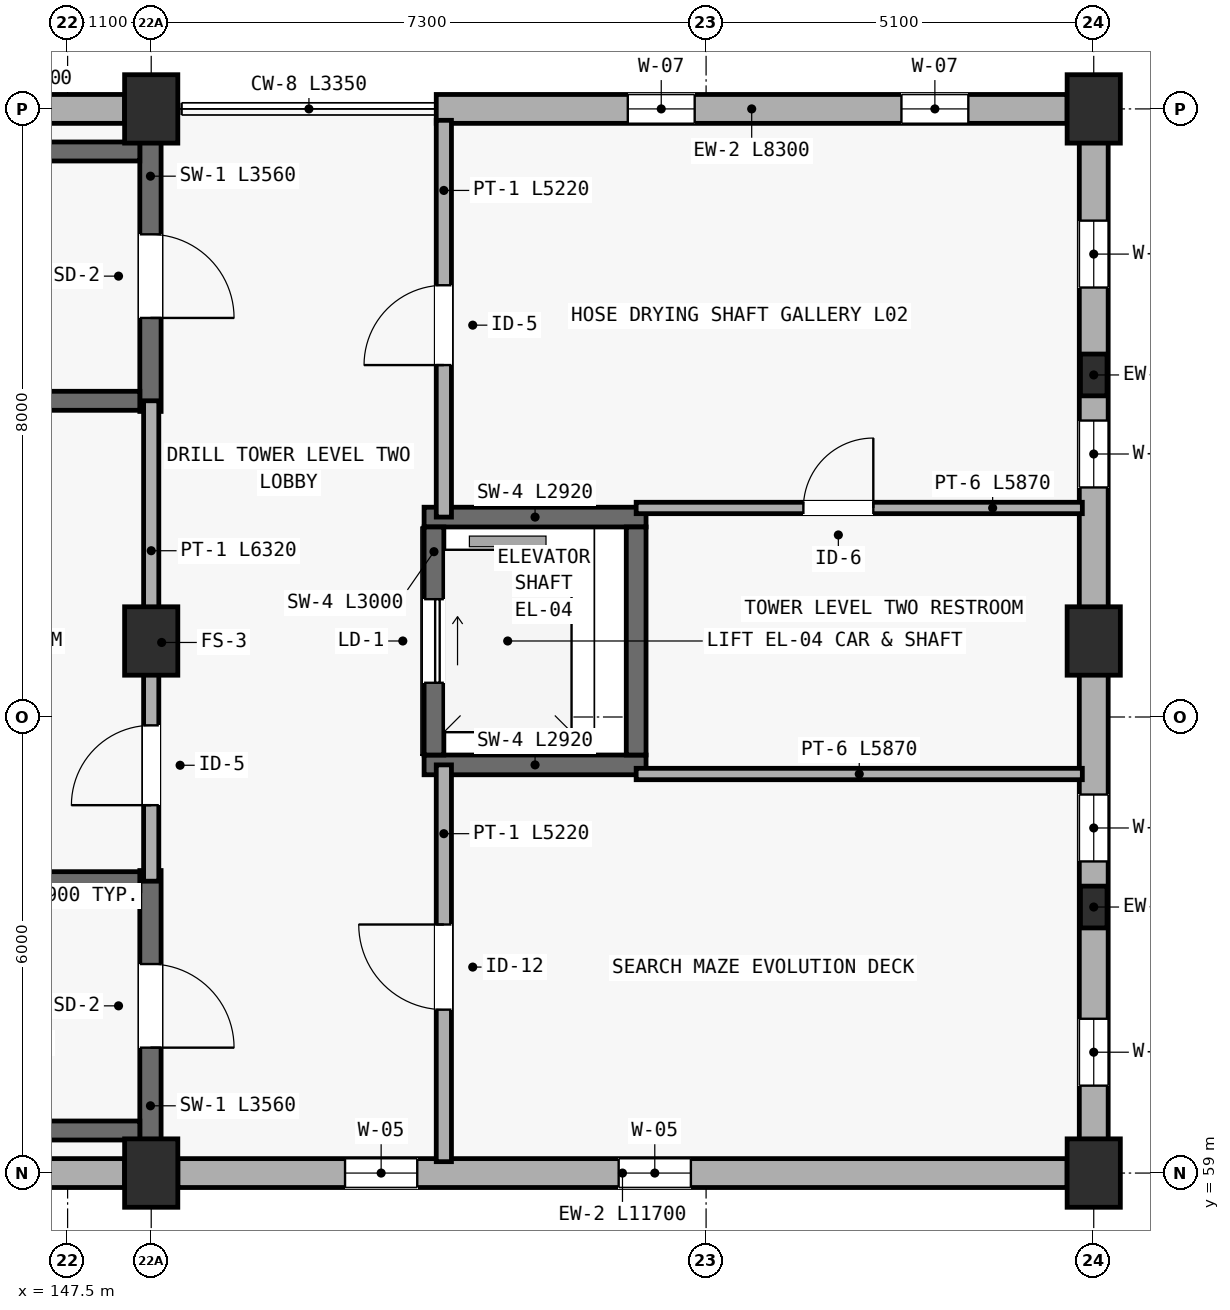
"""IFC4 building model, lengths in metres.
Left out: names, types, materials, properties, quantities, classifications, styles, units other than length and angle.
Written with IfcOpenShell. Run it as: python <this file> out.ifc"""

import sys

from ifc_helpers import new_model, si_unit, direction, frame, frame_2d, origin, origin_2d, place, context, subcontext, project, spatial, rectangle, extrude, element, fill, save


model = new_model("IFC4")
c1 = context("Model", 3, precision=1e-05, world=origin(), true_north=direction((0.0, 1.0)))
c2 = subcontext(c1, "Body", "Model", "MODEL_VIEW")
j1 = project(units=[si_unit("LENGTHUNIT", "METRE"), si_unit("PLANEANGLEUNIT", "RADIAN")], contexts=[c1])
p1 = place(None, origin())
s1 = spatial("IfcSite", under=j1, at=p1, CompositionType="ELEMENT")
p2 = place(p1, origin())
s2 = spatial("IfcBuilding", under=s1, at=p2, CompositionType="ELEMENT")
p3 = place(p2, frame((0.0, 0.0, 5.85)))
s3 = spatial("IfcBuildingStorey", under=s2, at=p3, CompositionType="ELEMENT", Elevation=5.85)
for number, where, z_axis, x_axis in (
    (1, (148.6, 59.0, 0.0), (0.0, 0.0, 1.0), (1.0, 0.0, 0.0)),
    (2, (148.6, 66.0, 0.0), (0.0, 0.0, 1.0), (1.0, 0.0, 0.0)),
    (3, (148.6, 73.0, 0.0), (0.0, 0.0, 1.0), (1.0, 0.0, 0.0)),
    (4, (161.0, 59.0, 0.0), (0.0, 0.0, 1.0), (1.0, 0.0, 0.0)),
    (5, (161.0, 66.0, 0.0), (0.0, 0.0, 1.0), (1.0, 0.0, 0.0)),
    (6, (161.0, 73.0, 0.0), (0.0, 0.0, 1.0), (1.0, 0.0, 0.0)),
):
    element("IfcColumn", number, at=place(p3, frame(where, z_axis=z_axis, x_axis=x_axis)), inside=s3, PredefinedType="COLUMN", context=c2, shape_type="SweptSolid", body=[
        extrude(rectangle(XDim=0.7, YDim=0.9, at=origin_2d()), origin(), (0.0, 0.0, 1.0), 3.45),
    ])
for number, where, z_axis, x_axis in (
    (7, (161.0, 62.5, 0.0), (0.0, 0.0, 1.0), (1.0, 0.0, 0.0)),
    (8, (161.0, 69.5, 0.0), (0.0, 0.0, 1.0), (1.0, 0.0, 0.0)),
):
    element("IfcColumn", number, at=place(p3, frame(where, z_axis=z_axis, x_axis=x_axis)), inside=s3, PredefinedType="PILASTER", context=c2, shape_type="SweptSolid", body=[
        extrude(rectangle(XDim=0.35, YDim=0.55, at=origin_2d()), origin(), (0.0, 0.0, 1.0), 3.45),
    ])
p4 = place(p3, frame((141.45, 59.0, 0.0), z_axis=(0.0, 0.0, 1.0), x_axis=(1.0, 0.0, 0.0)))
e9 = element("IfcWall", 9, at=p4, inside=s3, PredefinedType="STANDARD", context=c2, shape_type="SweptSolid", body=[
    extrude(rectangle(XDim=6.8, YDim=0.38, at=frame_2d((3.4, 0.0))), origin(), (0.0, 0.0, 1.0), 2.75),
])
p5 = place(p4, frame((0.85, 0.0, 0.75)))
e10 = element("IfcOpeningElement", 10, at=p5, cuts=e9, PredefinedType="OPENING", context=c2, shape_type="SweptSolid", body=[
    extrude(rectangle(XDim=1.1, YDim=1.35, at=frame_2d((0.55, 0.675))), frame((0.0, 0.2, 0.0), z_axis=(0.0, -1.0, 0.0), x_axis=(1.0, 0.0, 0.0)), (0.0, 0.0, 1.0), 0.4),
])
p6 = place(p4, frame((4.75, 0.0, 0.75)))
e11 = element("IfcOpeningElement", 11, at=p6, cuts=e9, PredefinedType="OPENING", context=c2, shape_type="SweptSolid", body=[
    extrude(rectangle(XDim=0.98, YDim=1.45, at=frame_2d((0.49, 0.725))), frame((0.0, 0.2, 0.0), z_axis=(0.0, -1.0, 0.0), x_axis=(1.0, 0.0, 0.0)), (0.0, 0.0, 1.0), 0.4),
])
p7 = place(p3, frame((148.95, 59.0, 0.0), z_axis=(0.0, 0.0, 1.0), x_axis=(1.0, 0.0, 0.0)))
e12 = element("IfcWall", 12, at=p7, inside=s3, PredefinedType="STANDARD", context=c2, shape_type="SweptSolid", body=[
    extrude(rectangle(XDim=11.7, YDim=0.38, at=frame_2d((5.85, 0.0))), origin(), (0.0, 0.0, 1.0), 2.75),
])
p8 = place(p7, frame((2.2, 0.0, 0.75)))
e13 = element("IfcOpeningElement", 13, at=p8, cuts=e12, PredefinedType="OPENING", context=c2, shape_type="SweptSolid", body=[
    extrude(rectangle(XDim=0.95, YDim=1.35, at=frame_2d((0.475, 0.675))), frame((0.0, 0.2, 0.0), z_axis=(0.0, -1.0, 0.0), x_axis=(1.0, 0.0, 0.0)), (0.0, 0.0, 1.0), 0.4),
])
p9 = place(p7, frame((5.8, 0.0, 0.75)))
e14 = element("IfcOpeningElement", 14, at=p9, cuts=e12, PredefinedType="OPENING", context=c2, shape_type="SweptSolid", body=[
    extrude(rectangle(XDim=0.95, YDim=1.35, at=frame_2d((0.475, 0.675))), frame((0.0, 0.2, 0.0), z_axis=(0.0, -1.0, 0.0), x_axis=(1.0, 0.0, 0.0)), (0.0, 0.0, 1.0), 0.4),
])
p10 = place(p3, frame((160.65, 73.0, 0.0), z_axis=(0.0, 0.0, 1.0), x_axis=(-1.0, 0.0, 0.0)))
e15 = element("IfcWall", 15, at=p10, inside=s3, PredefinedType="STANDARD", context=c2, shape_type="SweptSolid", body=[
    extrude(rectangle(XDim=8.3, YDim=0.38, at=frame_2d((4.15, 0.0))), origin(), (0.0, 0.0, 1.0), 2.75),
])
p11 = place(p10, frame((1.3, 0.0, 0.75)))
e16 = element("IfcOpeningElement", 16, at=p11, cuts=e15, PredefinedType="OPENING", context=c2, shape_type="SweptSolid", body=[
    extrude(rectangle(XDim=0.88, YDim=1.5, at=frame_2d((0.44, 0.75))), frame((0.0, 0.2, 0.0), z_axis=(0.0, -1.0, 0.0), x_axis=(1.0, 0.0, 0.0)), (0.0, 0.0, 1.0), 0.4),
])
p12 = place(p10, frame((4.9, 0.0, 0.75)))
e17 = element("IfcOpeningElement", 17, at=p12, cuts=e15, PredefinedType="OPENING", context=c2, shape_type="SweptSolid", body=[
    extrude(rectangle(XDim=0.88, YDim=1.5, at=frame_2d((0.44, 0.75))), frame((0.0, 0.2, 0.0), z_axis=(0.0, -1.0, 0.0), x_axis=(1.0, 0.0, 0.0)), (0.0, 0.0, 1.0), 0.4),
])
p13 = place(p3, frame((148.25, 73.0, 0.0), z_axis=(0.0, 0.0, 1.0), x_axis=(-1.0, 0.0, 0.0)))
e18 = element("IfcWall", 18, at=p13, inside=s3, PredefinedType="STANDARD", context=c2, shape_type="SweptSolid", body=[
    extrude(rectangle(XDim=6.8, YDim=0.38, at=frame_2d((3.4, 0.0))), origin(), (0.0, 0.0, 1.0), 2.75),
])
p14 = place(p13, frame((2.4, 0.0, 0.75)))
e19 = element("IfcOpeningElement", 19, at=p14, cuts=e18, PredefinedType="OPENING", context=c2, shape_type="SweptSolid", body=[
    extrude(rectangle(XDim=1.15, YDim=1.45, at=frame_2d((0.575, 0.725))), frame((0.0, 0.2, 0.0), z_axis=(0.0, -1.0, 0.0), x_axis=(1.0, 0.0, 0.0)), (0.0, 0.0, 1.0), 0.4),
])
p15 = place(p3, frame((161.0, 59.35, 0.0), z_axis=(0.0, 0.0, 1.0), x_axis=(0.0, 1.0, 0.0)))
e20 = element("IfcWall", 20, at=p15, inside=s3, PredefinedType="STANDARD", context=c2, shape_type="SweptSolid", body=[
    extrude(rectangle(XDim=6.3, YDim=0.38, at=frame_2d((3.15, 0.0))), origin(), (0.0, 0.0, 1.0), 2.75),
])
p16 = place(p15, frame((0.8, 0.0, 0.75)))
e21 = element("IfcOpeningElement", 21, at=p16, cuts=e20, PredefinedType="OPENING", context=c2, shape_type="SweptSolid", body=[
    extrude(rectangle(XDim=0.88, YDim=1.5, at=frame_2d((0.44, 0.75))), frame((0.0, 0.2, 0.0), z_axis=(0.0, -1.0, 0.0), x_axis=(1.0, 0.0, 0.0)), (0.0, 0.0, 1.0), 0.4),
])
p17 = place(p15, frame((3.75, 0.0, 0.75)))
e22 = element("IfcOpeningElement", 22, at=p17, cuts=e20, PredefinedType="OPENING", context=c2, shape_type="SweptSolid", body=[
    extrude(rectangle(XDim=0.88, YDim=1.5, at=frame_2d((0.44, 0.75))), frame((0.0, 0.2, 0.0), z_axis=(0.0, -1.0, 0.0), x_axis=(1.0, 0.0, 0.0)), (0.0, 0.0, 1.0), 0.4),
])
p18 = place(p3, frame((161.0, 66.35, 0.0), z_axis=(0.0, 0.0, 1.0), x_axis=(0.0, 1.0, 0.0)))
e23 = element("IfcWall", 23, at=p18, inside=s3, PredefinedType="STANDARD", context=c2, shape_type="SweptSolid", body=[
    extrude(rectangle(XDim=6.3, YDim=0.38, at=frame_2d((3.15, 0.0))), origin(), (0.0, 0.0, 1.0), 2.75),
])
p19 = place(p18, frame((1.67, 0.0, 0.75)))
e24 = element("IfcOpeningElement", 24, at=p19, cuts=e23, PredefinedType="OPENING", context=c2, shape_type="SweptSolid", body=[
    extrude(rectangle(XDim=0.88, YDim=1.5, at=frame_2d((0.44, 0.75))), frame((0.0, 0.2, 0.0), z_axis=(0.0, -1.0, 0.0), x_axis=(1.0, 0.0, 0.0)), (0.0, 0.0, 1.0), 0.4),
])
p20 = place(p18, frame((4.3, 0.0, 0.75)))
e25 = element("IfcOpeningElement", 25, at=p20, cuts=e23, PredefinedType="OPENING", context=c2, shape_type="SweptSolid", body=[
    extrude(rectangle(XDim=0.88, YDim=1.5, at=frame_2d((0.44, 0.75))), frame((0.0, 0.2, 0.0), z_axis=(0.0, -1.0, 0.0), x_axis=(1.0, 0.0, 0.0)), (0.0, 0.0, 1.0), 0.4),
])
p21 = place(p3, frame((148.59, 62.98, 0.0), z_axis=(0.0, 0.0, 1.0), x_axis=(0.0, -1.0, 0.0)))
e26 = element("IfcWall", 26, at=p21, inside=s3, PredefinedType="SHEAR", context=c2, shape_type="SweptSolid", body=[
    extrude(rectangle(XDim=3.56, YDim=0.28, at=frame_2d((1.78, 0.0))), origin(), (0.0, 0.0, 1.0), 3.2),
])
p22 = place(p21, frame((1.23, 0.0, 0.0)))
e27 = element("IfcOpeningElement", 27, at=p22, cuts=e26, PredefinedType="OPENING", context=c2, shape_type="SweptSolid", body=[
    extrude(rectangle(XDim=1.1, YDim=2.15, at=frame_2d((0.55, 1.075))), frame((0.0, 0.15, 0.0), z_axis=(0.0, -1.0, 0.0), x_axis=(1.0, 0.0, 0.0)), (0.0, 0.0, 1.0), 0.3),
])
for number, where, z_axis, x_axis in (
    (28, (148.45, 62.84, 0.0), (0.0, 0.0, 1.0), (-1.0, 0.0, 0.0)),
    (29, (141.85, 59.56, 0.0), (0.0, 0.0, 1.0), (1.0, 0.0, 0.0)),
):
    element("IfcWall", number, at=place(p3, frame(where, z_axis=z_axis, x_axis=x_axis)), inside=s3, PredefinedType="SHEAR", context=c2, shape_type="SweptSolid", body=[
        extrude(rectangle(XDim=6.6, YDim=0.25, at=frame_2d((3.3, 0.0))), origin(), (0.0, 0.0, 1.0), 3.2),
    ])
p23 = place(p3, frame((148.59, 72.58, 0.0), z_axis=(0.0, 0.0, 1.0), x_axis=(0.0, -1.0, 0.0)))
e30 = element("IfcWall", 30, at=p23, inside=s3, PredefinedType="SHEAR", context=c2, shape_type="SweptSolid", body=[
    extrude(rectangle(XDim=3.56, YDim=0.28, at=frame_2d((1.78, 0.0))), origin(), (0.0, 0.0, 1.0), 3.2),
])
p24 = place(p23, frame((1.23, 0.0, 0.0)))
e31 = element("IfcOpeningElement", 31, at=p24, cuts=e30, PredefinedType="OPENING", context=c2, shape_type="SweptSolid", body=[
    extrude(rectangle(XDim=1.1, YDim=2.15, at=frame_2d((0.55, 1.075))), frame((0.0, 0.15, 0.0), z_axis=(0.0, -1.0, 0.0), x_axis=(1.0, 0.0, 0.0)), (0.0, 0.0, 1.0), 0.3),
])
for number, where, z_axis, x_axis in (
    (32, (148.45, 72.44, 0.0), (0.0, 0.0, 1.0), (-1.0, 0.0, 0.0)),
    (33, (141.85, 69.16, 0.0), (0.0, 0.0, 1.0), (1.0, 0.0, 0.0)),
):
    element("IfcWall", number, at=place(p3, frame(where, z_axis=z_axis, x_axis=x_axis)), inside=s3, PredefinedType="SHEAR", context=c2, shape_type="SweptSolid", body=[
        extrude(rectangle(XDim=6.6, YDim=0.25, at=frame_2d((3.3, 0.0))), origin(), (0.0, 0.0, 1.0), 3.2),
    ])
for number, where, z_axis, x_axis in (
    (34, (152.19, 64.37, 0.0), (0.0, 0.0, 1.0), (1.0, 0.0, 0.0)),
    (35, (155.11, 67.63, 0.0), (0.0, 0.0, 1.0), (-1.0, 0.0, 0.0)),
):
    element("IfcWall", number, at=place(p3, frame(where, z_axis=z_axis, x_axis=x_axis)), inside=s3, PredefinedType="SHEAR", context=c2, shape_type="SweptSolid", body=[
        extrude(rectangle(XDim=2.92, YDim=0.26, at=frame_2d((1.46, 0.0))), origin(), (0.0, 0.0, 1.0), 3.2),
    ])
p25 = place(p3, frame((152.32, 67.5, 0.0), z_axis=(0.0, 0.0, 1.0), x_axis=(0.0, -1.0, 0.0)))
e36 = element("IfcWall", 36, at=p25, inside=s3, PredefinedType="SHEAR", context=c2, shape_type="SweptSolid", body=[
    extrude(rectangle(XDim=3.0, YDim=0.26, at=frame_2d((1.5, 0.0))), origin(), (0.0, 0.0, 1.0), 3.2),
])
p26 = place(p25, frame((0.95, 0.0, 0.0)))
e37 = element("IfcOpeningElement", 37, at=p26, cuts=e36, PredefinedType="OPENING", context=c2, shape_type="SweptSolid", body=[
    extrude(rectangle(XDim=1.1, YDim=2.15, at=frame_2d((0.55, 1.075))), frame((0.0, 0.14, 0.0), z_axis=(0.0, -1.0, 0.0), x_axis=(1.0, 0.0, 0.0)), (0.0, 0.0, 1.0), 0.28),
])
p27 = place(p3, frame((154.98, 64.5, 0.0), z_axis=(0.0, 0.0, 1.0), x_axis=(0.0, 1.0, 0.0)))
e38 = element("IfcWall", 38, at=p27, inside=s3, PredefinedType="SHEAR", context=c2, shape_type="SweptSolid", body=[
    extrude(rectangle(XDim=3.0, YDim=0.26, at=frame_2d((1.5, 0.0))), origin(), (0.0, 0.0, 1.0), 3.2),
])
p28 = place(p3, frame((148.6, 62.84, 0.0), z_axis=(0.0, 0.0, 1.0), x_axis=(0.0, 1.0, 0.0)))
e39 = element("IfcWall", 39, at=p28, inside=s3, PredefinedType="PARTITIONING", context=c2, shape_type="SweptSolid", body=[
    extrude(rectangle(XDim=6.32, YDim=0.2, at=frame_2d((3.16, 0.0))), origin(), (0.0, 0.0, 1.0), 2.7),
])
p29 = place(p28, frame((1.0, 0.0, 0.0)))
e40 = element("IfcOpeningElement", 40, at=p29, cuts=e39, PredefinedType="OPENING", context=c2, shape_type="SweptSolid", body=[
    extrude(rectangle(XDim=1.05, YDim=2.14, at=frame_2d((0.525, 1.07))), frame((0.0, 0.11, 0.0), z_axis=(0.0, -1.0, 0.0), x_axis=(1.0, 0.0, 0.0)), (0.0, 0.0, 1.0), 0.22),
])
p30 = place(p3, frame((152.45, 59.15, 0.0), z_axis=(0.0, 0.0, 1.0), x_axis=(0.0, 1.0, 0.0)))
e41 = element("IfcWall", 41, at=p30, inside=s3, PredefinedType="PARTITIONING", context=c2, shape_type="SweptSolid", body=[
    extrude(rectangle(XDim=5.22, YDim=0.2, at=frame_2d((2.61, 0.0))), origin(), (0.0, 0.0, 1.0), 2.7),
])
p31 = place(p30, frame((2.0, 0.0, 0.0)))
e42 = element("IfcOpeningElement", 42, at=p31, cuts=e41, PredefinedType="OPENING", context=c2, shape_type="SweptSolid", body=[
    extrude(rectangle(XDim=1.12, YDim=2.15, at=frame_2d((0.56, 1.075))), frame((0.0, 0.11, 0.0), z_axis=(0.0, -1.0, 0.0), x_axis=(1.0, 0.0, 0.0)), (0.0, 0.0, 1.0), 0.22),
])
p32 = place(p3, frame((152.45, 67.63, 0.0), z_axis=(0.0, 0.0, 1.0), x_axis=(0.0, 1.0, 0.0)))
e43 = element("IfcWall", 43, at=p32, inside=s3, PredefinedType="PARTITIONING", context=c2, shape_type="SweptSolid", body=[
    extrude(rectangle(XDim=5.22, YDim=0.2, at=frame_2d((2.61, 0.0))), origin(), (0.0, 0.0, 1.0), 2.7),
])
p33 = place(p32, frame((2.0, 0.0, 0.0)))
e44 = element("IfcOpeningElement", 44, at=p33, cuts=e43, PredefinedType="OPENING", context=c2, shape_type="SweptSolid", body=[
    extrude(rectangle(XDim=1.05, YDim=2.14, at=frame_2d((0.525, 1.07))), frame((0.0, 0.11, 0.0), z_axis=(0.0, -1.0, 0.0), x_axis=(1.0, 0.0, 0.0)), (0.0, 0.0, 1.0), 0.22),
])
p34 = place(p3, frame((154.98, 64.25, 0.0), z_axis=(0.0, 0.0, 1.0), x_axis=(1.0, 0.0, 0.0)))
e45 = element("IfcWall", 45, at=p34, inside=s3, PredefinedType="PARTITIONING", context=c2, shape_type="SweptSolid", body=[
    extrude(rectangle(XDim=5.87, YDim=0.15, at=frame_2d((2.935, 0.0))), origin(), (0.0, 0.0, 1.0), 2.7),
])
p35 = place(p3, frame((154.98, 67.75, 0.0), z_axis=(0.0, 0.0, 1.0), x_axis=(1.0, 0.0, 0.0)))
e46 = element("IfcWall", 46, at=p35, inside=s3, PredefinedType="PARTITIONING", context=c2, shape_type="SweptSolid", body=[
    extrude(rectangle(XDim=5.87, YDim=0.15, at=frame_2d((2.935, 0.0))), origin(), (0.0, 0.0, 1.0), 2.7),
])
p36 = place(p35, frame((2.2, 0.0, 0.0)))
e47 = element("IfcOpeningElement", 47, at=p36, cuts=e46, PredefinedType="OPENING", context=c2, shape_type="SweptSolid", body=[
    extrude(rectangle(XDim=0.92, YDim=2.1, at=frame_2d((0.46, 1.05))), frame((0.0, 0.085, 0.0), z_axis=(0.0, -1.0, 0.0), x_axis=(1.0, 0.0, 0.0)), (0.0, 0.0, 1.0), 0.17),
])
p37 = place(p8, origin())
e48 = element("IfcWindow", 48, at=p37, inside=s3, PartitioningType="SINGLE_PANEL", PredefinedType="WINDOW", context=c2, shape_type="SweptSolid", body=[
    extrude(rectangle(XDim=0.95, YDim=1.35, at=frame_2d((0.475, 0.675))), frame((0.0, 0.03, 0.0), z_axis=(0.0, -1.0, 0.0), x_axis=(1.0, 0.0, 0.0)), (0.0, 0.0, 1.0), 0.06),
])
fill(e13, e48)
p38 = place(p9, origin())
e49 = element("IfcWindow", 49, at=p38, inside=s3, PartitioningType="SINGLE_PANEL", PredefinedType="WINDOW", context=c2, shape_type="SweptSolid", body=[
    extrude(rectangle(XDim=0.95, YDim=1.35, at=frame_2d((0.475, 0.675))), frame((0.0, 0.03, 0.0), z_axis=(0.0, -1.0, 0.0), x_axis=(1.0, 0.0, 0.0)), (0.0, 0.0, 1.0), 0.06),
])
fill(e14, e49)
p39 = place(p11, origin())
e50 = element("IfcWindow", 50, at=p39, inside=s3, PartitioningType="SINGLE_PANEL", PredefinedType="WINDOW", context=c2, shape_type="SweptSolid", body=[
    extrude(rectangle(XDim=0.88, YDim=1.5, at=frame_2d((0.44, 0.75))), frame((0.0, 0.03, 0.0), z_axis=(0.0, -1.0, 0.0), x_axis=(1.0, 0.0, 0.0)), (0.0, 0.0, 1.0), 0.06),
])
fill(e16, e50)
p40 = place(p12, origin())
e51 = element("IfcWindow", 51, at=p40, inside=s3, PartitioningType="SINGLE_PANEL", PredefinedType="WINDOW", context=c2, shape_type="SweptSolid", body=[
    extrude(rectangle(XDim=0.88, YDim=1.5, at=frame_2d((0.44, 0.75))), frame((0.0, 0.03, 0.0), z_axis=(0.0, -1.0, 0.0), x_axis=(1.0, 0.0, 0.0)), (0.0, 0.0, 1.0), 0.06),
])
fill(e17, e51)
p41 = place(p16, origin())
e52 = element("IfcWindow", 52, at=p41, inside=s3, PartitioningType="SINGLE_PANEL", PredefinedType="WINDOW", context=c2, shape_type="SweptSolid", body=[
    extrude(rectangle(XDim=0.88, YDim=1.5, at=frame_2d((0.44, 0.75))), frame((0.0, 0.03, 0.0), z_axis=(0.0, -1.0, 0.0), x_axis=(1.0, 0.0, 0.0)), (0.0, 0.0, 1.0), 0.06),
])
fill(e21, e52)
p42 = place(p17, origin())
e53 = element("IfcWindow", 53, at=p42, inside=s3, PartitioningType="SINGLE_PANEL", PredefinedType="WINDOW", context=c2, shape_type="SweptSolid", body=[
    extrude(rectangle(XDim=0.88, YDim=1.5, at=frame_2d((0.44, 0.75))), frame((0.0, 0.03, 0.0), z_axis=(0.0, -1.0, 0.0), x_axis=(1.0, 0.0, 0.0)), (0.0, 0.0, 1.0), 0.06),
])
fill(e22, e53)
p43 = place(p19, origin())
e54 = element("IfcWindow", 54, at=p43, inside=s3, PartitioningType="SINGLE_PANEL", PredefinedType="WINDOW", context=c2, shape_type="SweptSolid", body=[
    extrude(rectangle(XDim=0.88, YDim=1.5, at=frame_2d((0.44, 0.75))), frame((0.0, 0.03, 0.0), z_axis=(0.0, -1.0, 0.0), x_axis=(1.0, 0.0, 0.0)), (0.0, 0.0, 1.0), 0.06),
])
fill(e24, e54)
p44 = place(p20, origin())
e55 = element("IfcWindow", 55, at=p44, inside=s3, PartitioningType="SINGLE_PANEL", PredefinedType="WINDOW", context=c2, shape_type="SweptSolid", body=[
    extrude(rectangle(XDim=0.88, YDim=1.5, at=frame_2d((0.44, 0.75))), frame((0.0, 0.03, 0.0), z_axis=(0.0, -1.0, 0.0), x_axis=(1.0, 0.0, 0.0)), (0.0, 0.0, 1.0), 0.06),
])
fill(e25, e55)
p45 = place(p22, origin())
e56 = element("IfcDoor", 56, at=p45, inside=s3, OperationType="SINGLE_SWING_RIGHT", PredefinedType="DOOR", context=c2, shape_type="SweptSolid", body=[
    extrude(rectangle(XDim=1.1, YDim=2.15, at=frame_2d((0.55, 1.075))), frame((0.0, 0.025, 0.0), z_axis=(0.0, -1.0, 0.0), x_axis=(1.0, 0.0, 0.0)), (0.0, 0.0, 1.0), 0.05),
])
fill(e27, e56)
p46 = place(p24, origin())
e57 = element("IfcDoor", 57, at=p46, inside=s3, OperationType="SINGLE_SWING_RIGHT", PredefinedType="DOOR", context=c2, shape_type="SweptSolid", body=[
    extrude(rectangle(XDim=1.1, YDim=2.15, at=frame_2d((0.55, 1.075))), frame((0.0, 0.025, 0.0), z_axis=(0.0, -1.0, 0.0), x_axis=(1.0, 0.0, 0.0)), (0.0, 0.0, 1.0), 0.05),
])
fill(e31, e57)
p47 = place(p26, origin())
e58 = element("IfcDoor", 58, at=p47, inside=s3, OperationType="SLIDING_TO_LEFT", PredefinedType="DOOR", context=c2, shape_type="SweptSolid", body=[
    extrude(rectangle(XDim=1.1, YDim=2.15, at=frame_2d((0.55, 1.075))), frame((0.0, 0.025, 0.0), z_axis=(0.0, -1.0, 0.0), x_axis=(1.0, 0.0, 0.0)), (0.0, 0.0, 1.0), 0.05),
])
fill(e37, e58)
p48 = place(p29, origin())
e59 = element("IfcDoor", 59, at=p48, inside=s3, OperationType="SINGLE_SWING_LEFT", PredefinedType="DOOR", context=c2, shape_type="SweptSolid", body=[
    extrude(rectangle(XDim=1.05, YDim=2.14, at=frame_2d((0.525, 1.07))), frame((0.0, 0.025, 0.0), z_axis=(0.0, -1.0, 0.0), x_axis=(1.0, 0.0, 0.0)), (0.0, 0.0, 1.0), 0.05),
])
fill(e40, e59)
p49 = place(p31, origin())
e60 = element("IfcDoor", 60, at=p49, inside=s3, OperationType="SINGLE_SWING_RIGHT", PredefinedType="DOOR", context=c2, shape_type="SweptSolid", body=[
    extrude(rectangle(XDim=1.12, YDim=2.15, at=frame_2d((0.56, 1.075))), frame((0.0, 0.025, 0.0), z_axis=(0.0, -1.0, 0.0), x_axis=(1.0, 0.0, 0.0)), (0.0, 0.0, 1.0), 0.05),
])
fill(e42, e60)
p50 = place(p33, origin())
e61 = element("IfcDoor", 61, at=p50, inside=s3, OperationType="SINGLE_SWING_LEFT", PredefinedType="DOOR", context=c2, shape_type="SweptSolid", body=[
    extrude(rectangle(XDim=1.05, YDim=2.14, at=frame_2d((0.525, 1.07))), frame((0.0, 0.025, 0.0), z_axis=(0.0, -1.0, 0.0), x_axis=(1.0, 0.0, 0.0)), (0.0, 0.0, 1.0), 0.05),
])
fill(e44, e61)
p51 = place(p36, origin())
e62 = element("IfcDoor", 62, at=p51, inside=s3, OperationType="SINGLE_SWING_RIGHT", PredefinedType="DOOR", context=c2, shape_type="SweptSolid", body=[
    extrude(rectangle(XDim=0.92, YDim=2.1, at=frame_2d((0.46, 1.05))), frame((0.0, 0.025, 0.0), z_axis=(0.0, -1.0, 0.0), x_axis=(1.0, 0.0, 0.0)), (0.0, 0.0, 1.0), 0.05),
])
fill(e47, e62)
save(model, sys.argv[1])
